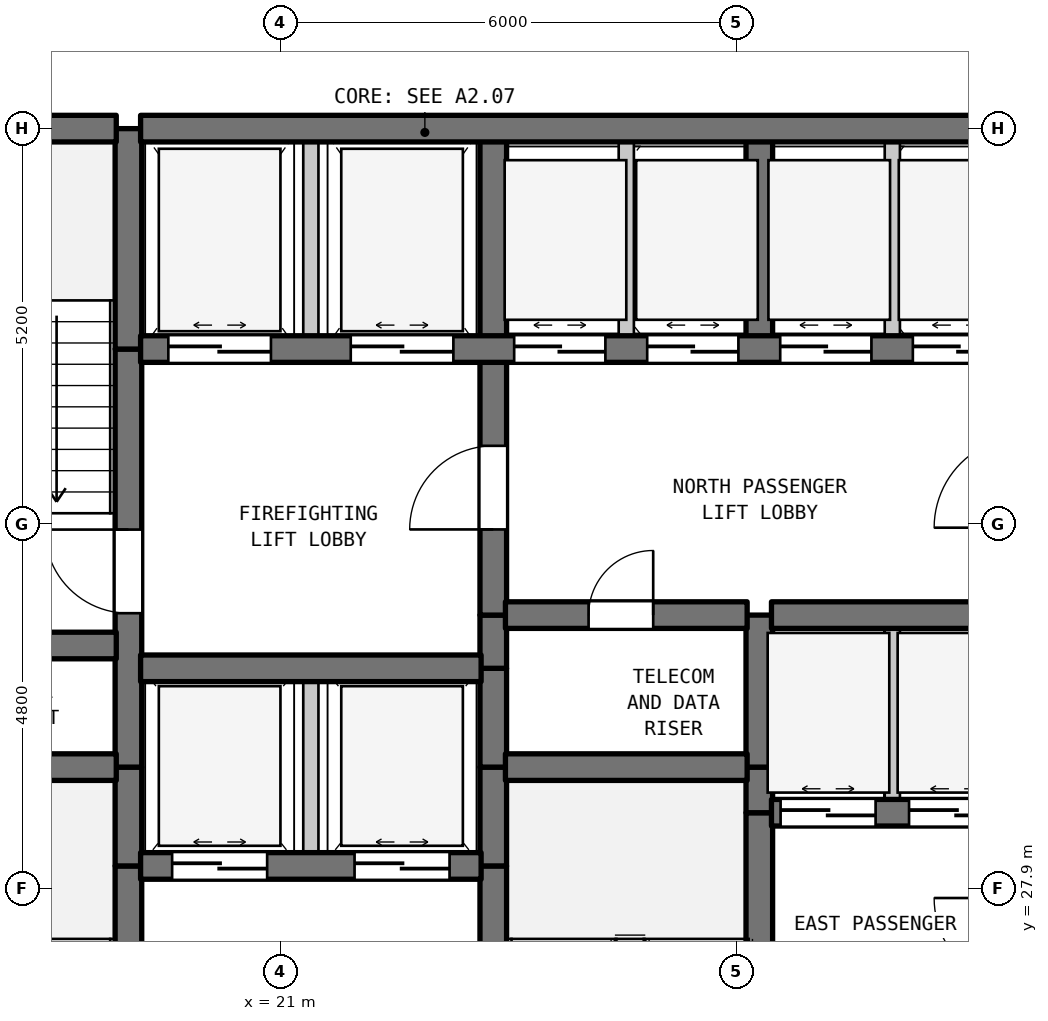
"""IFC4 building model, lengths in metres.
Left out: names, types, materials, properties, quantities, classifications, styles, units other than length and angle.
Written with IfcOpenShell. Run it as: python <this file> out.ifc"""

import sys

from ifc_helpers import new_model, si_unit, direction, frame, frame_2d, origin, place, context, subcontext, project, spatial, rectangle, extrude, element, fill, save


model = new_model("IFC4")
c1 = context("Model", 3, precision=1e-05, world=origin(), true_north=direction((0.0, 1.0)))
c2 = subcontext(c1, "Body", "Model", "MODEL_VIEW")
j1 = project(units=[si_unit("LENGTHUNIT", "METRE"), si_unit("PLANEANGLEUNIT", "RADIAN")], contexts=[c1])
p1 = place(None, origin())
s1 = spatial("IfcSite", under=j1, at=p1, CompositionType="ELEMENT")
p2 = place(p1, origin())
s2 = spatial("IfcBuilding", under=s1, at=p2, CompositionType="ELEMENT")
p3 = place(p2, frame((0.0, 0.0, 35.1)))
s3 = spatial("IfcBuildingStorey", under=s2, at=p3, CompositionType="ELEMENT", Elevation=35.1)
p4 = place(p3, frame((19.0, 22.7, 0.0), z_axis=(0.0, 0.0, 1.0), x_axis=(0.0, 1.0, 0.0)))
e1 = element("IfcWall", 1, at=p4, inside=s3, PredefinedType="SHEAR", context=c2, shape_type="SweptSolid", body=[
    extrude(rectangle(XDim=5.5, YDim=0.35, at=frame_2d((2.75, 0.0))), origin(), (0.0, 0.0, 1.0), 3.385),
])
p5 = place(p4, frame((0.631, 0.0, 0.0)))
e2 = element("IfcOpeningElement", 2, at=p5, cuts=e1, PredefinedType="OPENING", context=c2, shape_type="SweptSolid", body=[
    extrude(rectangle(XDim=1.1, YDim=2.15, at=frame_2d((0.55, 1.075))), frame((0.0, 0.185, 0.0), z_axis=(0.0, -1.0, 0.0), x_axis=(1.0, 0.0, 0.0)), (0.0, 0.0, 1.0), 0.37),
])
p6 = place(p3, frame((19.0, 28.2, 0.0), z_axis=(0.0, 0.0, 1.0), x_axis=(0.0, 1.0, 0.0)))
e3 = element("IfcWall", 3, at=p6, inside=s3, PredefinedType="SHEAR", context=c2, shape_type="SweptSolid", body=[
    extrude(rectangle(XDim=1.3, YDim=0.35, at=frame_2d((0.65, 0.0))), origin(), (0.0, 0.0, 1.0), 3.385),
])
p7 = place(p3, frame((19.0, 29.5, 0.0), z_axis=(0.0, 0.0, 1.0), x_axis=(0.0, 1.0, 0.0)))
e4 = element("IfcWall", 4, at=p7, inside=s3, PredefinedType="SHEAR", context=c2, shape_type="SweptSolid", body=[
    extrude(rectangle(XDim=5.5, YDim=0.35, at=frame_2d((2.75, 0.0))), origin(), (0.0, 0.0, 1.0), 3.385),
])
p8 = place(p7, frame((2.025, 0.0, 0.0)))
e5 = element("IfcOpeningElement", 5, at=p8, cuts=e4, PredefinedType="OPENING", context=c2, shape_type="SweptSolid", body=[
    extrude(rectangle(XDim=1.1, YDim=2.15, at=frame_2d((0.55, 1.075))), frame((0.0, 0.185, 0.0), z_axis=(0.0, -1.0, 0.0), x_axis=(1.0, 0.0, 0.0)), (0.0, 0.0, 1.0), 0.37),
])
p9 = place(p3, frame((19.0, 35.0, 0.0), z_axis=(0.0, 0.0, 1.0), x_axis=(0.0, 1.0, 0.0)))
e6 = element("IfcWall", 6, at=p9, inside=s3, PredefinedType="SHEAR", context=c2, shape_type="SweptSolid", body=[
    extrude(rectangle(XDim=2.9, YDim=0.35, at=frame_2d((1.45, 0.0))), origin(), (0.0, 0.0, 1.0), 3.385),
])
p10 = place(p3, frame((21.4, 28.2, 0.0), z_axis=(0.0, 0.0, 1.0), x_axis=(0.0, 1.0, 0.0)))
e7 = element("IfcWall", 7, at=p10, inside=s3, PredefinedType="STANDARD", context=c2, shape_type="SweptSolid", body=[
    extrude(rectangle(XDim=2.6, YDim=0.2, at=frame_2d((1.3, 0.0))), origin(), (0.0, 0.0, 1.0), 3.385),
])
p11 = place(p3, frame((21.4, 35.0, 0.0), z_axis=(0.0, 0.0, 1.0), x_axis=(0.0, 1.0, 0.0)))
e8 = element("IfcWall", 8, at=p11, inside=s3, PredefinedType="STANDARD", context=c2, shape_type="SweptSolid", body=[
    extrude(rectangle(XDim=2.9, YDim=0.2, at=frame_2d((1.45, 0.0))), origin(), (0.0, 0.0, 1.0), 3.385),
])
p12 = place(p3, frame((23.8, 22.7, 0.0), z_axis=(0.0, 0.0, 1.0), x_axis=(0.0, 1.0, 0.0)))
e9 = element("IfcWall", 9, at=p12, inside=s3, PredefinedType="SHEAR", context=c2, shape_type="SweptSolid", body=[
    extrude(rectangle(XDim=5.5, YDim=0.35, at=frame_2d((2.75, 0.0))), origin(), (0.0, 0.0, 1.0), 3.385),
])
p13 = place(p12, frame((0.235, 0.0, 0.0)))
e10 = element("IfcOpeningElement", 10, at=p13, cuts=e9, PredefinedType="OPENING", context=c2, shape_type="SweptSolid", body=[
    extrude(rectangle(XDim=1.1, YDim=2.15, at=frame_2d((0.55, 1.075))), frame((0.0, 0.185, 0.0), z_axis=(0.0, -1.0, 0.0), x_axis=(1.0, 0.0, 0.0)), (0.0, 0.0, 1.0), 0.37),
])
for number, where, z_axis, x_axis in (
    (11, (23.8, 28.2, 0.0), (0.0, 0.0, 1.0), (0.0, 1.0, 0.0)),
    (12, (23.8, 29.5, 0.0), (0.0, 0.0, 1.0), (0.0, 1.0, 0.0)),
):
    element("IfcWall", number, at=place(p3, frame(where, z_axis=z_axis, x_axis=x_axis)), inside=s3, PredefinedType="SHEAR", context=c2, shape_type="SweptSolid", body=[
        extrude(rectangle(XDim=1.3, YDim=0.35, at=frame_2d((0.65, 0.0))), origin(), (0.0, 0.0, 1.0), 3.385),
    ])
p14 = place(p3, frame((23.8, 30.8, 0.0), z_axis=(0.0, 0.0, 1.0), x_axis=(0.0, 1.0, 0.0)))
e13 = element("IfcWall", 13, at=p14, inside=s3, PredefinedType="SHEAR", context=c2, shape_type="SweptSolid", body=[
    extrude(rectangle(XDim=0.7, YDim=0.35, at=frame_2d((0.35, 0.0))), origin(), (0.0, 0.0, 1.0), 3.385),
])
p15 = place(p3, frame((23.8, 31.5, 0.0), z_axis=(0.0, 0.0, 1.0), x_axis=(0.0, 1.0, 0.0)))
e14 = element("IfcWall", 14, at=p15, inside=s3, PredefinedType="SHEAR", context=c2, shape_type="SweptSolid", body=[
    extrude(rectangle(XDim=3.5, YDim=0.35, at=frame_2d((1.75, 0.0))), origin(), (0.0, 0.0, 1.0), 3.385),
])
p16 = place(p15, frame((1.127, 0.0, 0.0)))
e15 = element("IfcOpeningElement", 15, at=p16, cuts=e14, PredefinedType="OPENING", context=c2, shape_type="SweptSolid", body=[
    extrude(rectangle(XDim=1.1, YDim=2.15, at=frame_2d((0.55, 1.075))), frame((0.0, 0.185, 0.0), z_axis=(0.0, -1.0, 0.0), x_axis=(1.0, 0.0, 0.0)), (0.0, 0.0, 1.0), 0.37),
])
p17 = place(p3, frame((23.8, 35.0, 0.0), z_axis=(0.0, 0.0, 1.0), x_axis=(0.0, 1.0, 0.0)))
e16 = element("IfcWall", 16, at=p17, inside=s3, PredefinedType="SHEAR", context=c2, shape_type="SweptSolid", body=[
    extrude(rectangle(XDim=2.9, YDim=0.35, at=frame_2d((1.45, 0.0))), origin(), (0.0, 0.0, 1.0), 3.385),
])
p18 = place(p3, frame((25.55, 35.0, 0.0), z_axis=(0.0, 0.0, 1.0), x_axis=(0.0, 1.0, 0.0)))
e17 = element("IfcWall", 17, at=p18, inside=s3, PredefinedType="STANDARD", context=c2, shape_type="SweptSolid", body=[
    extrude(rectangle(XDim=2.9, YDim=0.2, at=frame_2d((1.45, 0.0))), origin(), (0.0, 0.0, 1.0), 3.385),
])
p19 = place(p3, frame((27.3, 25.6, 0.0), z_axis=(0.0, 0.0, 1.0), x_axis=(0.0, 1.0, 0.0)))
e18 = element("IfcWall", 18, at=p19, inside=s3, PredefinedType="SHEAR", context=c2, shape_type="SweptSolid", body=[
    extrude(rectangle(XDim=3.3, YDim=0.35, at=frame_2d((1.65, 0.0))), origin(), (0.0, 0.0, 1.0), 3.385),
])
p20 = place(p3, frame((27.3, 28.9, 0.0), z_axis=(0.0, 0.0, 1.0), x_axis=(0.0, 1.0, 0.0)))
e19 = element("IfcWall", 19, at=p20, inside=s3, PredefinedType="SHEAR", context=c2, shape_type="SweptSolid", body=[
    extrude(rectangle(XDim=0.6, YDim=0.35, at=frame_2d((0.3, 0.0))), origin(), (0.0, 0.0, 1.0), 3.385),
])
p21 = place(p3, frame((27.3, 29.5, 0.0), z_axis=(0.0, 0.0, 1.0), x_axis=(0.0, 1.0, 0.0)))
e20 = element("IfcWall", 20, at=p21, inside=s3, PredefinedType="SHEAR", context=c2, shape_type="SweptSolid", body=[
    extrude(rectangle(XDim=2.0, YDim=0.35, at=frame_2d((1.0, 0.0))), origin(), (0.0, 0.0, 1.0), 3.385),
])
p22 = place(p3, frame((27.3, 35.0, 0.0), z_axis=(0.0, 0.0, 1.0), x_axis=(0.0, 1.0, 0.0)))
e21 = element("IfcWall", 21, at=p22, inside=s3, PredefinedType="SHEAR", context=c2, shape_type="SweptSolid", body=[
    extrude(rectangle(XDim=2.9, YDim=0.35, at=frame_2d((1.45, 0.0))), origin(), (0.0, 0.0, 1.0), 3.385),
])
p23 = place(p3, frame((29.05, 28.9, 0.0), z_axis=(0.0, 0.0, 1.0), x_axis=(0.0, 1.0, 0.0)))
e22 = element("IfcWall", 22, at=p23, inside=s3, PredefinedType="STANDARD", context=c2, shape_type="SweptSolid", body=[
    extrude(rectangle(XDim=2.6, YDim=0.2, at=frame_2d((1.3, 0.0))), origin(), (0.0, 0.0, 1.0), 3.385),
])
p24 = place(p3, frame((29.05, 35.0, 0.0), z_axis=(0.0, 0.0, 1.0), x_axis=(0.0, 1.0, 0.0)))
e23 = element("IfcWall", 23, at=p24, inside=s3, PredefinedType="STANDARD", context=c2, shape_type="SweptSolid", body=[
    extrude(rectangle(XDim=2.9, YDim=0.2, at=frame_2d((1.45, 0.0))), origin(), (0.0, 0.0, 1.0), 3.385),
])
p25 = place(p3, frame((19.16, 28.2, 0.0), z_axis=(0.0, 0.0, 1.0), x_axis=(1.0, 0.0, 0.0)))
e24 = element("IfcWall", 24, at=p25, inside=s3, PredefinedType="SHEAR", context=c2, shape_type="SweptSolid", body=[
    extrude(rectangle(XDim=4.48, YDim=0.35, at=frame_2d((2.24, 0.0))), origin(), (0.0, 0.0, 1.0), 3.385),
])
p26 = place(p25, frame((0.415, 0.0, 0.0)))
e25 = element("IfcOpeningElement", 25, at=p26, cuts=e24, PredefinedType="OPENING", context=c2, shape_type="SweptSolid", body=[
    extrude(rectangle(XDim=1.25, YDim=2.2, at=frame_2d((0.625, 1.1))), frame((0.0, 0.185, 0.0), z_axis=(0.0, -1.0, 0.0), x_axis=(1.0, 0.0, 0.0)), (0.0, 0.0, 1.0), 0.37),
])
p27 = place(p25, frame((2.815, 0.0, 0.0)))
e26 = element("IfcOpeningElement", 26, at=p27, cuts=e24, PredefinedType="OPENING", context=c2, shape_type="SweptSolid", body=[
    extrude(rectangle(XDim=1.25, YDim=2.2, at=frame_2d((0.625, 1.1))), frame((0.0, 0.185, 0.0), z_axis=(0.0, -1.0, 0.0), x_axis=(1.0, 0.0, 0.0)), (0.0, 0.0, 1.0), 0.37),
])
p28 = place(p3, frame((27.46, 28.9, 0.0), z_axis=(0.0, 0.0, 1.0), x_axis=(1.0, 0.0, 0.0)))
e27 = element("IfcWall", 27, at=p28, inside=s3, PredefinedType="SHEAR", context=c2, shape_type="SweptSolid", body=[
    extrude(rectangle(XDim=3.18, YDim=0.35, at=frame_2d((1.59, 0.0))), origin(), (0.0, 0.0, 1.0), 3.385),
])
p29 = place(p28, frame((0.12, 0.0, 0.0)))
e28 = element("IfcOpeningElement", 28, at=p29, cuts=e27, PredefinedType="OPENING", context=c2, shape_type="SweptSolid", body=[
    extrude(rectangle(XDim=1.25, YDim=2.2, at=frame_2d((0.625, 1.1))), frame((0.0, 0.185, 0.0), z_axis=(0.0, -1.0, 0.0), x_axis=(1.0, 0.0, 0.0)), (0.0, 0.0, 1.0), 0.37),
])
p30 = place(p28, frame((1.81, 0.0, 0.0)))
e29 = element("IfcOpeningElement", 29, at=p30, cuts=e27, PredefinedType="OPENING", context=c2, shape_type="SweptSolid", body=[
    extrude(rectangle(XDim=1.25, YDim=2.2, at=frame_2d((0.625, 1.1))), frame((0.0, 0.185, 0.0), z_axis=(0.0, -1.0, 0.0), x_axis=(1.0, 0.0, 0.0)), (0.0, 0.0, 1.0), 0.37),
])
p31 = place(p3, frame((15.16, 29.5, 0.0), z_axis=(0.0, 0.0, 1.0), x_axis=(1.0, 0.0, 0.0)))
e30 = element("IfcWall", 30, at=p31, inside=s3, PredefinedType="SHEAR", context=c2, shape_type="SweptSolid", body=[
    extrude(rectangle(XDim=3.68, YDim=0.35, at=frame_2d((1.84, 0.0))), origin(), (0.0, 0.0, 1.0), 3.385),
])
p32 = place(p3, frame((23.96, 29.5, 0.0), z_axis=(0.0, 0.0, 1.0), x_axis=(1.0, 0.0, 0.0)))
e31 = element("IfcWall", 31, at=p32, inside=s3, PredefinedType="SHEAR", context=c2, shape_type="SweptSolid", body=[
    extrude(rectangle(XDim=3.18, YDim=0.35, at=frame_2d((1.59, 0.0))), origin(), (0.0, 0.0, 1.0), 3.385),
])
p33 = place(p3, frame((19.16, 30.8, 0.0), z_axis=(0.0, 0.0, 1.0), x_axis=(1.0, 0.0, 0.0)))
e32 = element("IfcWall", 32, at=p33, inside=s3, PredefinedType="SHEAR", context=c2, shape_type="SweptSolid", body=[
    extrude(rectangle(XDim=4.48, YDim=0.35, at=frame_2d((2.24, 0.0))), origin(), (0.0, 0.0, 1.0), 3.385),
])
p34 = place(p3, frame((15.16, 31.1, 0.0), z_axis=(0.0, 0.0, 1.0), x_axis=(1.0, 0.0, 0.0)))
e33 = element("IfcWall", 33, at=p34, inside=s3, PredefinedType="SHEAR", context=c2, shape_type="SweptSolid", body=[
    extrude(rectangle(XDim=3.68, YDim=0.35, at=frame_2d((1.84, 0.0))), origin(), (0.0, 0.0, 1.0), 3.385),
])
p35 = place(p3, frame((23.96, 31.5, 0.0), z_axis=(0.0, 0.0, 1.0), x_axis=(1.0, 0.0, 0.0)))
e34 = element("IfcWall", 34, at=p35, inside=s3, PredefinedType="SHEAR", context=c2, shape_type="SweptSolid", body=[
    extrude(rectangle(XDim=3.18, YDim=0.35, at=frame_2d((1.59, 0.0))), origin(), (0.0, 0.0, 1.0), 3.385),
])
p36 = place(p35, frame((1.094, 0.0, 0.0)))
e35 = element("IfcOpeningElement", 35, at=p36, cuts=e34, PredefinedType="OPENING", context=c2, shape_type="SweptSolid", body=[
    extrude(rectangle(XDim=0.85, YDim=2.1, at=frame_2d((0.425, 1.05))), frame((0.0, 0.185, 0.0), z_axis=(0.0, -1.0, 0.0), x_axis=(1.0, 0.0, 0.0)), (0.0, 0.0, 1.0), 0.37),
])
p37 = place(p3, frame((27.46, 31.5, 0.0), z_axis=(0.0, 0.0, 1.0), x_axis=(1.0, 0.0, 0.0)))
e36 = element("IfcWall", 36, at=p37, inside=s3, PredefinedType="SHEAR", context=c2, shape_type="SweptSolid", body=[
    extrude(rectangle(XDim=3.18, YDim=0.35, at=frame_2d((1.59, 0.0))), origin(), (0.0, 0.0, 1.0), 3.385),
])
p38 = place(p3, frame((19.16, 35.0, 0.0), z_axis=(0.0, 0.0, 1.0), x_axis=(1.0, 0.0, 0.0)))
e37 = element("IfcWall", 37, at=p38, inside=s3, PredefinedType="SHEAR", context=c2, shape_type="SweptSolid", body=[
    extrude(rectangle(XDim=11.48, YDim=0.35, at=frame_2d((5.74, 0.0))), origin(), (0.0, 0.0, 1.0), 3.385),
])
p39 = place(p38, frame((0.365, 0.0, 0.0)))
e38 = element("IfcOpeningElement", 38, at=p39, cuts=e37, PredefinedType="OPENING", context=c2, shape_type="SweptSolid", body=[
    extrude(rectangle(XDim=1.35, YDim=2.2, at=frame_2d((0.675, 1.1))), frame((0.0, 0.185, 0.0), z_axis=(0.0, -1.0, 0.0), x_axis=(1.0, 0.0, 0.0)), (0.0, 0.0, 1.0), 0.37),
])
p40 = place(p38, frame((2.765, 0.0, 0.0)))
e39 = element("IfcOpeningElement", 39, at=p40, cuts=e37, PredefinedType="OPENING", context=c2, shape_type="SweptSolid", body=[
    extrude(rectangle(XDim=1.35, YDim=2.2, at=frame_2d((0.675, 1.1))), frame((0.0, 0.185, 0.0), z_axis=(0.0, -1.0, 0.0), x_axis=(1.0, 0.0, 0.0)), (0.0, 0.0, 1.0), 0.37),
])
p41 = place(p38, frame((4.915, 0.0, 0.0)))
e40 = element("IfcOpeningElement", 40, at=p41, cuts=e37, PredefinedType="OPENING", context=c2, shape_type="SweptSolid", body=[
    extrude(rectangle(XDim=1.2, YDim=2.2, at=frame_2d((0.6, 1.1))), frame((0.0, 0.185, 0.0), z_axis=(0.0, -1.0, 0.0), x_axis=(1.0, 0.0, 0.0)), (0.0, 0.0, 1.0), 0.37),
])
p42 = place(p38, frame((6.665, 0.0, 0.0)))
e41 = element("IfcOpeningElement", 41, at=p42, cuts=e37, PredefinedType="OPENING", context=c2, shape_type="SweptSolid", body=[
    extrude(rectangle(XDim=1.2, YDim=2.2, at=frame_2d((0.6, 1.1))), frame((0.0, 0.185, 0.0), z_axis=(0.0, -1.0, 0.0), x_axis=(1.0, 0.0, 0.0)), (0.0, 0.0, 1.0), 0.37),
])
p43 = place(p38, frame((8.415, 0.0, 0.0)))
e42 = element("IfcOpeningElement", 42, at=p43, cuts=e37, PredefinedType="OPENING", context=c2, shape_type="SweptSolid", body=[
    extrude(rectangle(XDim=1.2, YDim=2.2, at=frame_2d((0.6, 1.1))), frame((0.0, 0.185, 0.0), z_axis=(0.0, -1.0, 0.0), x_axis=(1.0, 0.0, 0.0)), (0.0, 0.0, 1.0), 0.37),
])
p44 = place(p38, frame((10.16, 0.0, 0.0)))
e43 = element("IfcOpeningElement", 43, at=p44, cuts=e37, PredefinedType="OPENING", context=c2, shape_type="SweptSolid", body=[
    extrude(rectangle(XDim=1.2, YDim=2.2, at=frame_2d((0.6, 1.1))), frame((0.0, 0.185, 0.0), z_axis=(0.0, -1.0, 0.0), x_axis=(1.0, 0.0, 0.0)), (0.0, 0.0, 1.0), 0.37),
])
p45 = place(p3, frame((15.16, 37.9, 0.0), z_axis=(0.0, 0.0, 1.0), x_axis=(1.0, 0.0, 0.0)))
e44 = element("IfcWall", 44, at=p45, inside=s3, PredefinedType="SHEAR", context=c2, shape_type="SweptSolid", body=[
    extrude(rectangle(XDim=3.68, YDim=0.35, at=frame_2d((1.84, 0.0))), origin(), (0.0, 0.0, 1.0), 3.385),
])
p46 = place(p3, frame((19.16, 37.9, 0.0), z_axis=(0.0, 0.0, 1.0), x_axis=(1.0, 0.0, 0.0)))
e45 = element("IfcWall", 45, at=p46, inside=s3, PredefinedType="SHEAR", context=c2, shape_type="SweptSolid", body=[
    extrude(rectangle(XDim=11.48, YDim=0.35, at=frame_2d((5.74, 0.0))), origin(), (0.0, 0.0, 1.0), 3.385),
])
p47 = place(p8, origin())
e46 = element("IfcDoor", 46, at=p47, inside=s3, OperationType="SINGLE_SWING_RIGHT", PredefinedType="DOOR", context=c2, shape_type="SweptSolid", body=[
    extrude(rectangle(XDim=1.1, YDim=2.15, at=frame_2d((0.55, 1.075))), frame((0.0, 0.025, 0.0), z_axis=(0.0, -1.0, 0.0), x_axis=(1.0, 0.0, 0.0)), (0.0, 0.0, 1.0), 0.05),
])
fill(e5, e46)
p48 = place(p16, origin())
e47 = element("IfcDoor", 47, at=p48, inside=s3, OperationType="SINGLE_SWING_LEFT", PredefinedType="DOOR", context=c2, shape_type="SweptSolid", body=[
    extrude(rectangle(XDim=1.1, YDim=2.15, at=frame_2d((0.55, 1.075))), frame((0.0, 0.025, 0.0), z_axis=(0.0, -1.0, 0.0), x_axis=(1.0, 0.0, 0.0)), (0.0, 0.0, 1.0), 0.05),
])
fill(e15, e47)
p49 = place(p26, origin())
e48 = element("IfcDoor", 48, at=p49, inside=s3, OperationType="DOUBLE_DOOR_SLIDING", PredefinedType="DOOR", context=c2, shape_type="SweptSolid", body=[
    extrude(rectangle(XDim=1.25, YDim=2.2, at=frame_2d((0.625, 1.1))), frame((0.0, 0.025, 0.0), z_axis=(0.0, -1.0, 0.0), x_axis=(1.0, 0.0, 0.0)), (0.0, 0.0, 1.0), 0.05),
])
fill(e25, e48)
p50 = place(p27, origin())
e49 = element("IfcDoor", 49, at=p50, inside=s3, OperationType="DOUBLE_DOOR_SLIDING", PredefinedType="DOOR", context=c2, shape_type="SweptSolid", body=[
    extrude(rectangle(XDim=1.25, YDim=2.2, at=frame_2d((0.625, 1.1))), frame((0.0, 0.025, 0.0), z_axis=(0.0, -1.0, 0.0), x_axis=(1.0, 0.0, 0.0)), (0.0, 0.0, 1.0), 0.05),
])
fill(e26, e49)
p51 = place(p29, origin())
e50 = element("IfcDoor", 50, at=p51, inside=s3, OperationType="DOUBLE_DOOR_SLIDING", PredefinedType="DOOR", context=c2, shape_type="SweptSolid", body=[
    extrude(rectangle(XDim=1.25, YDim=2.2, at=frame_2d((0.625, 1.1))), frame((0.0, 0.025, 0.0), z_axis=(0.0, -1.0, 0.0), x_axis=(1.0, 0.0, 0.0)), (0.0, 0.0, 1.0), 0.05),
])
fill(e28, e50)
p52 = place(p30, origin())
e51 = element("IfcDoor", 51, at=p52, inside=s3, OperationType="DOUBLE_DOOR_SLIDING", PredefinedType="DOOR", context=c2, shape_type="SweptSolid", body=[
    extrude(rectangle(XDim=1.25, YDim=2.2, at=frame_2d((0.625, 1.1))), frame((0.0, 0.025, 0.0), z_axis=(0.0, -1.0, 0.0), x_axis=(1.0, 0.0, 0.0)), (0.0, 0.0, 1.0), 0.05),
])
fill(e29, e51)
p53 = place(p36, origin())
e52 = element("IfcDoor", 52, at=p53, inside=s3, OperationType="SINGLE_SWING_RIGHT", PredefinedType="DOOR", context=c2, shape_type="SweptSolid", body=[
    extrude(rectangle(XDim=0.85, YDim=2.1, at=frame_2d((0.425, 1.05))), frame((0.0, 0.025, 0.0), z_axis=(0.0, -1.0, 0.0), x_axis=(1.0, 0.0, 0.0)), (0.0, 0.0, 1.0), 0.05),
])
fill(e35, e52)
p54 = place(p39, origin())
e53 = element("IfcDoor", 53, at=p54, inside=s3, OperationType="DOUBLE_DOOR_SLIDING", PredefinedType="DOOR", context=c2, shape_type="SweptSolid", body=[
    extrude(rectangle(XDim=1.35, YDim=2.2, at=frame_2d((0.675, 1.1))), frame((0.0, 0.025, 0.0), z_axis=(0.0, -1.0, 0.0), x_axis=(1.0, 0.0, 0.0)), (0.0, 0.0, 1.0), 0.05),
])
fill(e38, e53)
p55 = place(p40, origin())
e54 = element("IfcDoor", 54, at=p55, inside=s3, OperationType="DOUBLE_DOOR_SLIDING", PredefinedType="DOOR", context=c2, shape_type="SweptSolid", body=[
    extrude(rectangle(XDim=1.35, YDim=2.2, at=frame_2d((0.675, 1.1))), frame((0.0, 0.025, 0.0), z_axis=(0.0, -1.0, 0.0), x_axis=(1.0, 0.0, 0.0)), (0.0, 0.0, 1.0), 0.05),
])
fill(e39, e54)
p56 = place(p41, origin())
e55 = element("IfcDoor", 55, at=p56, inside=s3, OperationType="DOUBLE_DOOR_SLIDING", PredefinedType="DOOR", context=c2, shape_type="SweptSolid", body=[
    extrude(rectangle(XDim=1.2, YDim=2.2, at=frame_2d((0.6, 1.1))), frame((0.0, 0.025, 0.0), z_axis=(0.0, -1.0, 0.0), x_axis=(1.0, 0.0, 0.0)), (0.0, 0.0, 1.0), 0.05),
])
fill(e40, e55)
p57 = place(p42, origin())
e56 = element("IfcDoor", 56, at=p57, inside=s3, OperationType="DOUBLE_DOOR_SLIDING", PredefinedType="DOOR", context=c2, shape_type="SweptSolid", body=[
    extrude(rectangle(XDim=1.2, YDim=2.2, at=frame_2d((0.6, 1.1))), frame((0.0, 0.025, 0.0), z_axis=(0.0, -1.0, 0.0), x_axis=(1.0, 0.0, 0.0)), (0.0, 0.0, 1.0), 0.05),
])
fill(e41, e56)
p58 = place(p43, origin())
e57 = element("IfcDoor", 57, at=p58, inside=s3, OperationType="DOUBLE_DOOR_SLIDING", PredefinedType="DOOR", context=c2, shape_type="SweptSolid", body=[
    extrude(rectangle(XDim=1.2, YDim=2.2, at=frame_2d((0.6, 1.1))), frame((0.0, 0.025, 0.0), z_axis=(0.0, -1.0, 0.0), x_axis=(1.0, 0.0, 0.0)), (0.0, 0.0, 1.0), 0.05),
])
fill(e42, e57)
p59 = place(p44, origin())
e58 = element("IfcDoor", 58, at=p59, inside=s3, OperationType="DOUBLE_DOOR_SLIDING", PredefinedType="DOOR", context=c2, shape_type="SweptSolid", body=[
    extrude(rectangle(XDim=1.2, YDim=2.2, at=frame_2d((0.6, 1.1))), frame((0.0, 0.025, 0.0), z_axis=(0.0, -1.0, 0.0), x_axis=(1.0, 0.0, 0.0)), (0.0, 0.0, 1.0), 0.05),
])
fill(e43, e58)
save(model, sys.argv[1])
